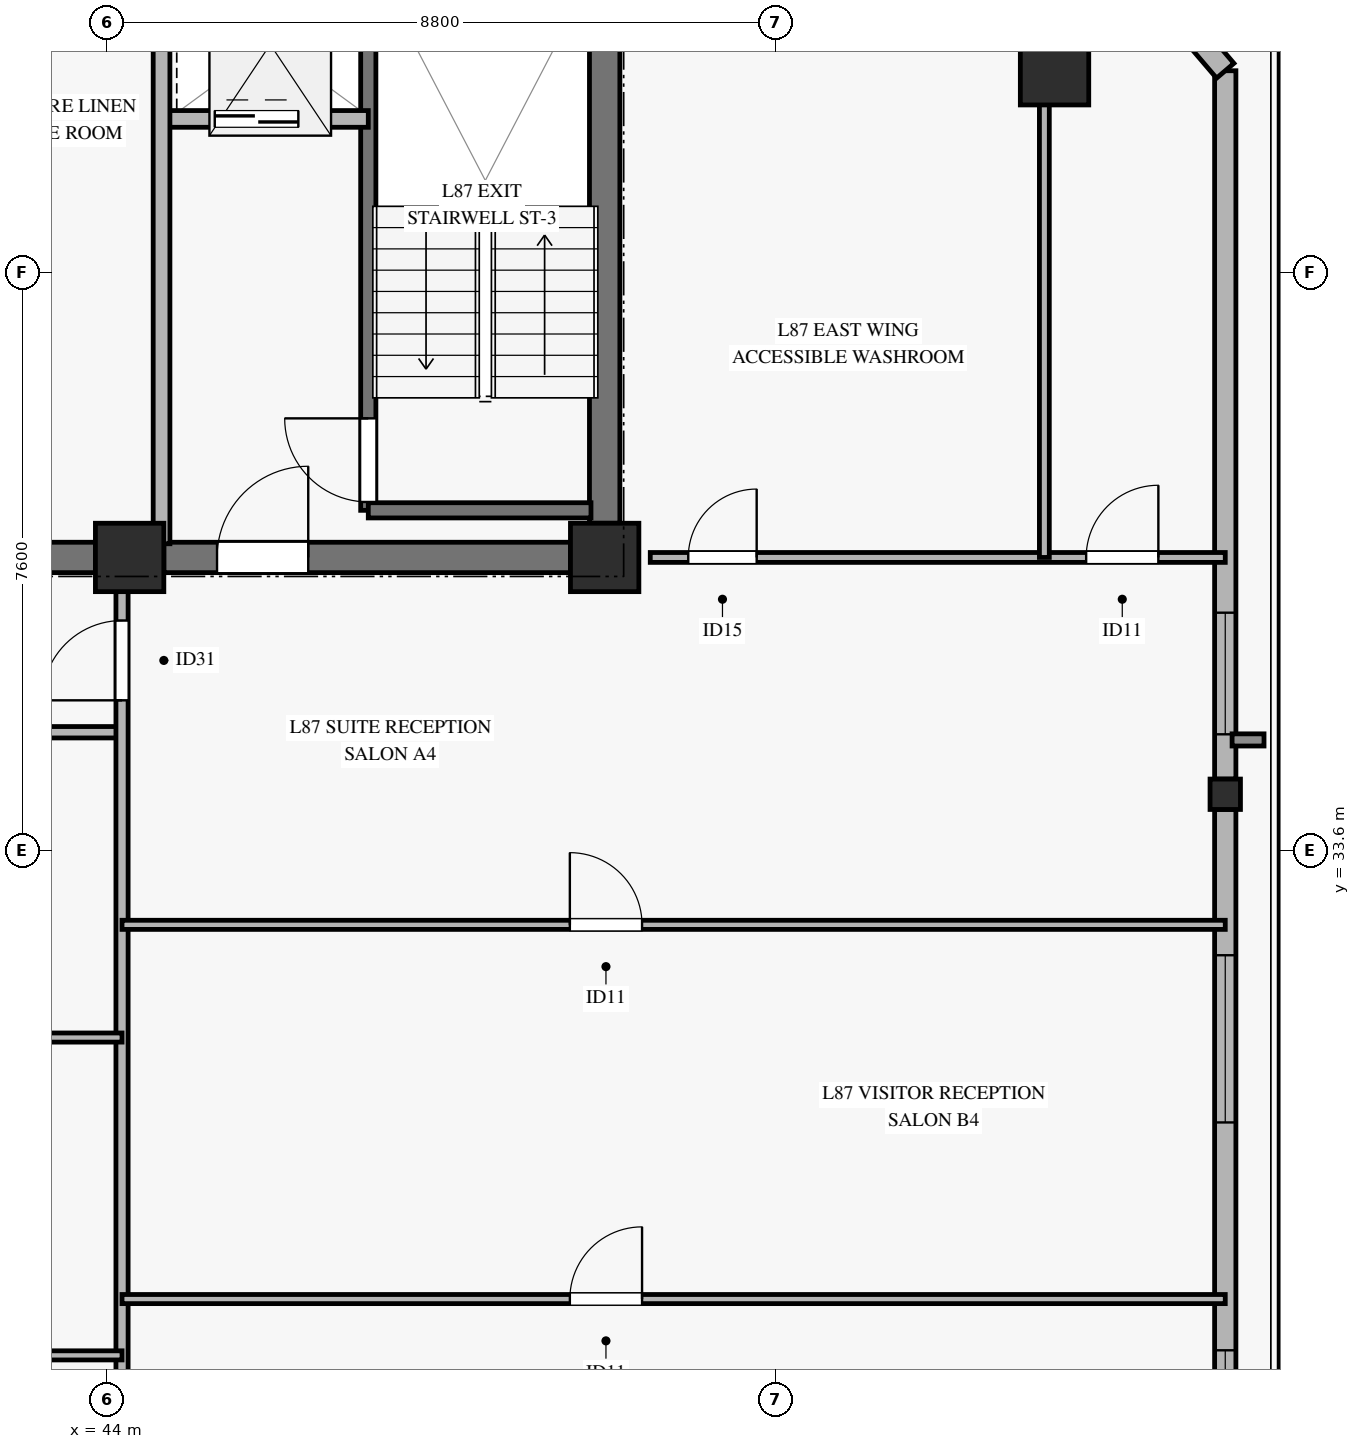
"""IFC4 building model, lengths in metres.
Left out: names, types, materials, properties, quantities, classifications, styles, units other than length and angle.
Written with IfcOpenShell. Run it as: python <this file> out.ifc"""

import sys

from ifc_helpers import new_model, si_unit, direction, frame, frame_2d, origin, origin_2d, place, context, subcontext, project, spatial, rectangle, hollow_rectangle, extrude, source, transform, mapped, element, fill, save


model = new_model("IFC4")
c1 = context("Model", 3, precision=1e-05, world=origin(), true_north=direction((0.0, 1.0)))
c2 = subcontext(c1, "Body", "Model", "MODEL_VIEW")
j1 = project(units=[si_unit("LENGTHUNIT", "METRE"), si_unit("PLANEANGLEUNIT", "RADIAN")], contexts=[c1])
p1 = place(None, origin())
s1 = spatial("IfcSite", under=j1, at=p1, CompositionType="ELEMENT")
p2 = place(p1, origin())
s2 = spatial("IfcBuilding", under=s1, at=p2, CompositionType="ELEMENT")
p3 = place(p2, frame((0.0, 0.0, 335.7)))
s3 = spatial("IfcBuildingStorey", under=s2, at=p3, CompositionType="ELEMENT", Elevation=335.7)
m1 = source(origin(), c2, "Body", "SweptSolid", [
    extrude(rectangle(XDim=0.9, YDim=0.9, at=origin_2d()), origin(), (0.0, 0.0, 1.0), 3.185),
])
for number, where, z_axis, x_axis in (
    (1, (44.3, 37.45, 0.0), (0.0, 0.0, 1.0), (1.0, 0.0, 0.0)),
    (2, (50.55, 37.45, 0.0), (0.0, 0.0, 1.0), (1.0, 0.0, 0.0)),
):
    element("IfcColumn", number, at=place(p3, frame(where, z_axis=z_axis, x_axis=x_axis)), inside=s3, PredefinedType="PILASTER", context=c2, shape_type="MappedRepresentation", body=[
        mapped(m1, transform((0.0, 0.0, 0.0), x_axis=(1.0, 0.0, 0.0), y_axis=(0.0, 1.0, 0.0), z_axis=(0.0, 0.0, 1.0), scale=1.0)),
    ])
p4 = place(p3, frame((36.05, 37.45, 0.0), z_axis=(0.0, 0.0, 1.0), x_axis=(1.0, 0.0, 0.0)))
e3 = element("IfcWall", 3, at=p4, inside=s3, PredefinedType="SHEAR", context=c2, shape_type="SweptSolid", body=[
    extrude(rectangle(XDim=7.8, YDim=0.4, at=frame_2d((3.9, 0.0))), origin(), (0.0, 0.0, 1.0), 3.185),
])
p5 = place(p3, frame((44.75, 37.45, 0.0), z_axis=(0.0, 0.0, 1.0), x_axis=(1.0, 0.0, 0.0)))
e4 = element("IfcWall", 4, at=p5, inside=s3, PredefinedType="SHEAR", context=c2, shape_type="SweptSolid", body=[
    extrude(rectangle(XDim=5.35, YDim=0.4, at=frame_2d((2.675, 0.0))), origin(), (0.0, 0.0, 1.0), 3.185),
])
p6 = place(p5, frame((0.7, 0.0, 0.0)))
e5 = element("IfcOpeningElement", 5, at=p6, cuts=e4, PredefinedType="OPENING", context=c2, shape_type="SweptSolid", body=[
    extrude(rectangle(XDim=1.2, YDim=2.15, at=frame_2d((0.6, 1.075))), frame((0.0, 0.21, 0.0), z_axis=(0.0, -1.0, 0.0), x_axis=(1.0, 0.0, 0.0)), (0.0, 0.0, 1.0), 0.42),
])
p7 = place(p3, frame((50.55, 37.9, 0.0), z_axis=(0.0, 0.0, 1.0), x_axis=(0.0, 1.0, 0.0)))
e6 = element("IfcWall", 6, at=p7, inside=s3, PredefinedType="SHEAR", context=c2, shape_type="SweptSolid", body=[
    extrude(rectangle(XDim=8.2, YDim=0.4, at=frame_2d((4.1, 0.0))), origin(), (0.0, 0.0, 1.0), 3.185),
])
m2 = source(origin(), c2, "Body", "SweptSolid", [
    extrude(hollow_rectangle(XDim=0.9, YDim=0.9, WallThickness=0.04, at=origin_2d()), origin(), (0.0, 0.0, 1.0), 3.185),
])
p8 = place(p3, frame((56.469, 43.854, 0.0), z_axis=(0.0, 0.0, 1.0), x_axis=(1.0, 0.0, 0.0)))
e7 = element("IfcColumn", 7, at=p8, inside=s3, PredefinedType="COLUMN", context=c2, shape_type="MappedRepresentation", body=[
    mapped(m2, transform((0.0, 0.0, 0.0), x_axis=(1.0, 0.0, 0.0), y_axis=(0.0, 1.0, 0.0), z_axis=(0.0, 0.0, 1.0), scale=1.0)),
])
m3 = source(origin(), c2, "Body", "SweptSolid", [
    extrude(hollow_rectangle(XDim=0.4, YDim=0.4, WallThickness=0.02, at=origin_2d()), origin(), (0.0, 0.0, 1.0), 3.185),
])
p9 = place(p3, frame((58.715, 34.334, 0.0), z_axis=(0.0, 0.0, 1.0), x_axis=(1.0, 0.0, 0.0)))
e8 = element("IfcColumn", 8, at=p9, inside=s3, PredefinedType="COLUMN", context=c2, shape_type="MappedRepresentation", body=[
    mapped(m3, transform((0.0, 0.0, 0.0), x_axis=(1.0, 0.0, 0.0), y_axis=(0.0, 1.0, 0.0), z_axis=(0.0, 0.0, 1.0), scale=1.0)),
])
p10 = place(p3, frame((58.715, 24.814, 0.0), z_axis=(0.0, 0.0, 1.0), x_axis=(0.0, 1.0, 0.0)))
e9 = element("IfcWall", 9, at=p10, inside=s3, PredefinedType="SOLIDWALL", context=c2, shape_type="SweptSolid", body=[
    extrude(rectangle(XDim=9.32, YDim=0.28, at=frame_2d((4.66, 0.0))), origin(), (0.0, 0.0, 1.0), 2.815),
])
p11 = place(p10, frame((0.604, 0.0, 0.45)))
e10 = element("IfcOpeningElement", 10, at=p11, cuts=e9, PredefinedType="OPENING", context=c2, shape_type="SweptSolid", body=[
    extrude(rectangle(XDim=1.6, YDim=2.0, at=frame_2d((0.8, 1.0))), frame((0.0, 0.15, 0.0), z_axis=(0.0, -1.0, 0.0), x_axis=(1.0, 0.0, 0.0)), (0.0, 0.0, 1.0), 0.3),
])
p12 = place(p10, frame((5.202, 0.0, 0.45)))
e11 = element("IfcOpeningElement", 11, at=p12, cuts=e9, PredefinedType="OPENING", context=c2, shape_type="SweptSolid", body=[
    extrude(rectangle(XDim=2.2, YDim=2.1, at=frame_2d((1.1, 1.05))), frame((0.0, 0.15, 0.0), z_axis=(0.0, -1.0, 0.0), x_axis=(1.0, 0.0, 0.0)), (0.0, 0.0, 1.0), 0.3),
])
p13 = place(p3, frame((58.715, 34.534, 0.0), z_axis=(0.0, 0.0, 1.0), x_axis=(0.0, 1.0, 0.0)))
e12 = element("IfcWall", 12, at=p13, inside=s3, PredefinedType="SOLIDWALL", context=c2, shape_type="SweptSolid", body=[
    extrude(rectangle(XDim=9.32, YDim=0.28, at=frame_2d((4.66, 0.0))), origin(), (0.0, 0.0, 1.0), 2.815),
])
p14 = place(p13, frame((0.589, 0.0, 0.45)))
e13 = element("IfcOpeningElement", 13, at=p14, cuts=e12, PredefinedType="OPENING", context=c2, shape_type="SweptSolid", body=[
    extrude(rectangle(XDim=1.6, YDim=2.0, at=frame_2d((0.8, 1.0))), frame((0.0, 0.15, 0.0), z_axis=(0.0, -1.0, 0.0), x_axis=(1.0, 0.0, 0.0)), (0.0, 0.0, 1.0), 0.3),
])
p15 = place(p3, frame((58.715, 43.854, 0.0), z_axis=(0.0, 0.0, 1.0), x_axis=(-0.64940558052, 0.760442234486, 0.0)))
e14 = element("IfcWall", 14, at=p15, inside=s3, PredefinedType="SOLIDWALL", context=c2, shape_type="SweptSolid", body=[
    extrude(rectangle(XDim=3.151, YDim=0.3, at=frame_2d((1.575, 0.0))), origin(), (0.0, 0.0, 1.0), 2.815),
])
p16 = place(p15, frame((0.775, 0.0, 0.45)))
e15 = element("IfcOpeningElement", 15, at=p16, cuts=e14, PredefinedType="OPENING", context=c2, shape_type="SweptSolid", body=[
    extrude(rectangle(XDim=1.6, YDim=2.0, at=frame_2d((0.8, 1.0))), frame((0.0, 0.16, 0.0), z_axis=(0.0, -1.0, 0.0), x_axis=(1.0, 0.0, 0.0)), (0.0, 0.0, 1.0), 0.32),
])
p17 = place(p3, frame((47.44, 38.07, 0.0), z_axis=(0.0, 0.0, 1.0), x_axis=(0.0, 1.0, 0.0)))
e16 = element("IfcWall", 16, at=p17, inside=s3, PredefinedType="SOLIDWALL", context=c2, shape_type="SweptSolid", body=[
    extrude(rectangle(XDim=7.25, YDim=0.2, at=frame_2d((3.625, 0.0))), origin(), (0.0, 0.0, 1.0), 3.4),
])
p18 = place(p17, frame((0.11, 0.0, 0.0)))
e17 = element("IfcOpeningElement", 17, at=p18, cuts=e16, PredefinedType="OPENING", context=c2, shape_type="SweptSolid", body=[
    extrude(rectangle(XDim=1.1, YDim=2.15, at=frame_2d((0.55, 1.075))), frame((0.0, 0.11, 0.0), z_axis=(0.0, -1.0, 0.0), x_axis=(1.0, 0.0, 0.0)), (0.0, 0.0, 1.0), 0.22),
])
p19 = place(p3, frame((47.44, 38.07, 0.0), z_axis=(0.0, 0.0, 1.0), x_axis=(1.0, 0.0, 0.0)))
e18 = element("IfcWall", 18, at=p19, inside=s3, PredefinedType="SOLIDWALL", context=c2, shape_type="SweptSolid", body=[
    extrude(rectangle(XDim=2.93, YDim=0.2, at=frame_2d((1.465, 0.0))), origin(), (0.0, 0.0, 1.0), 3.4),
])
p20 = place(p3, frame((44.72, 43.22, 0.0), z_axis=(0.0, 0.0, 1.0), x_axis=(1.0, 0.0, 0.0)))
e19 = element("IfcWall", 19, at=p20, inside=s3, PredefinedType="SOLIDWALL", context=c2, shape_type="SweptSolid", body=[
    extrude(rectangle(XDim=2.72, YDim=0.22, at=frame_2d((1.36, 0.0))), origin(), (0.0, 0.0, 1.0), 3.185),
])
p21 = place(p20, frame((0.7, 0.0, 0.0)))
e20 = element("IfcOpeningElement", 20, at=p21, cuts=e19, PredefinedType="OPENING", context=c2, shape_type="SweptSolid", body=[
    extrude(rectangle(XDim=1.1, YDim=2.2, at=frame_2d((0.55, 1.1))), frame((0.0, 0.12, 0.0), z_axis=(0.0, -1.0, 0.0), x_axis=(1.0, 0.0, 0.0)), (0.0, 0.0, 1.0), 0.24),
])
p22 = place(p3, frame((44.72, 37.63, 0.0), z_axis=(0.0, 0.0, 1.0), x_axis=(0.0, 1.0, 0.0)))
e21 = element("IfcWall", 21, at=p22, inside=s3, PredefinedType="SOLIDWALL", context=c2, shape_type="SweptSolid", body=[
    extrude(rectangle(XDim=7.59, YDim=0.22, at=frame_2d((3.795, 0.0))), origin(), (0.0, 0.0, 1.0), 3.185),
])
p23 = place(p3, frame((21.0, 35.15, 0.0), z_axis=(0.0, 0.0, 1.0), x_axis=(1.0, 0.0, 0.0)))
e22 = element("IfcWall", 22, at=p23, inside=s3, PredefinedType="PARTITIONING", context=c2, shape_type="SweptSolid", body=[
    extrude(rectangle(XDim=23.2, YDim=0.15, at=frame_2d((11.6, 0.0))), origin(), (0.0, 0.0, 1.0), 2.47),
])
p24 = place(p23, frame((4.577, 0.0, 0.0)))
e23 = element("IfcOpeningElement", 23, at=p24, cuts=e22, PredefinedType="OPENING", context=c2, shape_type="SweptSolid", body=[
    extrude(rectangle(XDim=1.05, YDim=2.15, at=frame_2d((0.525, 1.075))), frame((0.0, 0.085, 0.0), z_axis=(0.0, -1.0, 0.0), x_axis=(1.0, 0.0, 0.0)), (0.0, 0.0, 1.0), 0.17),
])
p25 = place(p23, frame((16.177, 0.0, 0.0)))
e24 = element("IfcOpeningElement", 24, at=p25, cuts=e22, PredefinedType="OPENING", context=c2, shape_type="SweptSolid", body=[
    extrude(rectangle(XDim=1.05, YDim=2.15, at=frame_2d((0.525, 1.075))), frame((0.0, 0.085, 0.0), z_axis=(0.0, -1.0, 0.0), x_axis=(1.0, 0.0, 0.0)), (0.0, 0.0, 1.0), 0.17),
])
p26 = place(p3, frame((44.2, 22.568, 0.0), z_axis=(0.0, 0.0, 1.0), x_axis=(0.0, 1.0, 0.0)))
e25 = element("IfcWall", 25, at=p26, inside=s3, PredefinedType="PARTITIONING", context=c2, shape_type="SweptSolid", body=[
    extrude(rectangle(XDim=14.882, YDim=0.16, at=frame_2d((7.441, 0.0))), origin(), (0.0, 0.0, 1.0), 2.47),
])
p27 = place(p26, frame((13.002, 0.0, 0.0)))
e26 = element("IfcOpeningElement", 26, at=p27, cuts=e25, PredefinedType="OPENING", context=c2, shape_type="SweptSolid", body=[
    extrude(rectangle(XDim=1.05, YDim=2.15, at=frame_2d((0.525, 1.075))), frame((0.0, 0.09, 0.0), z_axis=(0.0, -1.0, 0.0), x_axis=(1.0, 0.0, 0.0)), (0.0, 0.0, 1.0), 0.18),
])
p28 = place(p3, frame((32.6, 26.951, 0.0), z_axis=(0.0, 0.0, 1.0), x_axis=(1.0, 0.0, 0.0)))
e27 = element("IfcWall", 27, at=p28, inside=s3, PredefinedType="PARTITIONING", context=c2, shape_type="SweptSolid", body=[
    extrude(rectangle(XDim=11.6, YDim=0.12, at=frame_2d((5.8, 0.0))), origin(), (0.0, 0.0, 1.0), 2.47),
])
p29 = place(p28, frame((4.806, 0.0, 0.0)))
e28 = element("IfcOpeningElement", 28, at=p29, cuts=e27, PredefinedType="OPENING", context=c2, shape_type="SweptSolid", body=[
    extrude(rectangle(XDim=0.95, YDim=2.1, at=frame_2d((0.475, 1.05))), frame((0.0, 0.07, 0.0), z_axis=(0.0, -1.0, 0.0), x_axis=(1.0, 0.0, 0.0)), (0.0, 0.0, 1.0), 0.14),
])
p30 = place(p3, frame((32.6, 31.133, 0.0), z_axis=(0.0, 0.0, 1.0), x_axis=(1.0, 0.0, 0.0)))
e29 = element("IfcWall", 29, at=p30, inside=s3, PredefinedType="PARTITIONING", context=c2, shape_type="SweptSolid", body=[
    extrude(rectangle(XDim=11.6, YDim=0.12, at=frame_2d((5.8, 0.0))), origin(), (0.0, 0.0, 1.0), 2.47),
])
p31 = place(p30, frame((4.806, 0.0, 0.0)))
e30 = element("IfcOpeningElement", 30, at=p31, cuts=e29, PredefinedType="OPENING", context=c2, shape_type="SweptSolid", body=[
    extrude(rectangle(XDim=0.95, YDim=2.1, at=frame_2d((0.475, 1.05))), frame((0.0, 0.07, 0.0), z_axis=(0.0, -1.0, 0.0), x_axis=(1.0, 0.0, 0.0)), (0.0, 0.0, 1.0), 0.14),
])
p32 = place(p3, frame((44.2, 27.692, 0.0), z_axis=(0.0, 0.0, 1.0), x_axis=(1.0, 0.0, 0.0)))
e31 = element("IfcWall", 31, at=p32, inside=s3, PredefinedType="PARTITIONING", context=c2, shape_type="SweptSolid", body=[
    extrude(rectangle(XDim=14.515, YDim=0.12, at=frame_2d((7.258, 0.0))), origin(), (0.0, 0.0, 1.0), 2.47),
])
p33 = place(p32, frame((5.892, 0.0, 0.0)))
e32 = element("IfcOpeningElement", 32, at=p33, cuts=e31, PredefinedType="OPENING", context=c2, shape_type="SweptSolid", body=[
    extrude(rectangle(XDim=0.95, YDim=2.1, at=frame_2d((0.475, 1.05))), frame((0.0, 0.07, 0.0), z_axis=(0.0, -1.0, 0.0), x_axis=(1.0, 0.0, 0.0)), (0.0, 0.0, 1.0), 0.14),
])
p34 = place(p3, frame((44.2, 32.616, 0.0), z_axis=(0.0, 0.0, 1.0), x_axis=(1.0, 0.0, 0.0)))
e33 = element("IfcWall", 33, at=p34, inside=s3, PredefinedType="PARTITIONING", context=c2, shape_type="SweptSolid", body=[
    extrude(rectangle(XDim=14.515, YDim=0.12, at=frame_2d((7.258, 0.0))), origin(), (0.0, 0.0, 1.0), 2.47),
])
p35 = place(p34, frame((5.892, 0.0, 0.0)))
e34 = element("IfcOpeningElement", 34, at=p35, cuts=e33, PredefinedType="OPENING", context=c2, shape_type="SweptSolid", body=[
    extrude(rectangle(XDim=0.95, YDim=2.1, at=frame_2d((0.475, 1.05))), frame((0.0, 0.07, 0.0), z_axis=(0.0, -1.0, 0.0), x_axis=(1.0, 0.0, 0.0)), (0.0, 0.0, 1.0), 0.14),
])
p36 = place(p3, frame((51.15, 37.45, 0.0), z_axis=(0.0, 0.0, 1.0), x_axis=(1.0, 0.0, 0.0)))
e35 = element("IfcWall", 35, at=p36, inside=s3, PredefinedType="PARTITIONING", context=c2, shape_type="SweptSolid", body=[
    extrude(rectangle(XDim=7.565, YDim=0.13, at=frame_2d((3.783, 0.0))), origin(), (0.0, 0.0, 1.0), 2.82),
])
p37 = place(p36, frame((0.5, 0.0, 0.0)))
e36 = element("IfcOpeningElement", 36, at=p37, cuts=e35, PredefinedType="OPENING", context=c2, shape_type="SweptSolid", body=[
    extrude(rectangle(XDim=0.9, YDim=2.1, at=frame_2d((0.45, 1.05))), frame((0.0, 0.075, 0.0), z_axis=(0.0, -1.0, 0.0), x_axis=(1.0, 0.0, 0.0)), (0.0, 0.0, 1.0), 0.15),
])
p38 = place(p36, frame((5.735, 0.0, 0.0)))
e37 = element("IfcOpeningElement", 37, at=p38, cuts=e35, PredefinedType="OPENING", context=c2, shape_type="SweptSolid", body=[
    extrude(rectangle(XDim=0.95, YDim=2.1, at=frame_2d((0.475, 1.05))), frame((0.0, 0.075, 0.0), z_axis=(0.0, -1.0, 0.0), x_axis=(1.0, 0.0, 0.0)), (0.0, 0.0, 1.0), 0.15),
])
p39 = place(p3, frame((56.335, 37.45, 0.0), z_axis=(0.0, 0.0, 1.0), x_axis=(0.0, 1.0, 0.0)))
e38 = element("IfcWall", 38, at=p39, inside=s3, PredefinedType="PARTITIONING", context=c2, shape_type="SweptSolid", body=[
    extrude(rectangle(XDim=8.8, YDim=0.13, at=frame_2d((4.4, 0.0))), origin(), (0.0, 0.0, 1.0), 2.82),
])
m4 = source(origin(), c2, "Body", "SweptSolid", [
    extrude(rectangle(XDim=1.6, YDim=2.0, at=frame_2d((0.8, 1.0))), frame((0.0, 0.03, 0.0), z_axis=(0.0, -1.0, 0.0), x_axis=(1.0, 0.0, 0.0)), (0.0, 0.0, 1.0), 0.06),
])
p40 = place(p11, origin())
e39 = element("IfcWindow", 39, at=p40, inside=s3, PartitioningType="SINGLE_PANEL", PredefinedType="WINDOW", context=c2, shape_type="MappedRepresentation", body=[
    mapped(m4, transform((0.0, 0.0, 0.0), x_axis=(1.0, 0.0, 0.0), y_axis=(0.0, 1.0, 0.0), z_axis=(0.0, 0.0, 1.0), scale=1.0)),
])
fill(e10, e39)
m5 = source(origin(), c2, "Body", "SweptSolid", [
    extrude(rectangle(XDim=2.2, YDim=2.1, at=frame_2d((1.1, 1.05))), frame((0.0, 0.03, 0.0), z_axis=(0.0, -1.0, 0.0), x_axis=(1.0, 0.0, 0.0)), (0.0, 0.0, 1.0), 0.06),
])
p41 = place(p12, origin())
e40 = element("IfcWindow", 40, at=p41, inside=s3, PartitioningType="SINGLE_PANEL", PredefinedType="WINDOW", context=c2, shape_type="MappedRepresentation", body=[
    mapped(m5, transform((0.0, 0.0, 0.0), x_axis=(1.0, 0.0, 0.0), y_axis=(0.0, 1.0, 0.0), z_axis=(0.0, 0.0, 1.0), scale=1.0)),
])
fill(e11, e40)
p42 = place(p14, origin())
e41 = element("IfcWindow", 41, at=p42, inside=s3, PartitioningType="SINGLE_PANEL", PredefinedType="WINDOW", context=c2, shape_type="MappedRepresentation", body=[
    mapped(m4, transform((0.0, 0.0, 0.0), x_axis=(1.0, 0.0, 0.0), y_axis=(0.0, 1.0, 0.0), z_axis=(0.0, 0.0, 1.0), scale=1.0)),
])
fill(e13, e41)
m6 = source(origin(), c2, "Body", "SweptSolid", [
    extrude(rectangle(XDim=1.1, YDim=2.15, at=frame_2d((0.55, 1.075))), frame((0.0, 0.025, 0.0), z_axis=(0.0, -1.0, 0.0), x_axis=(1.0, 0.0, 0.0)), (0.0, 0.0, 1.0), 0.05),
])
p43 = place(p18, origin())
e42 = element("IfcDoor", 42, at=p43, inside=s3, OperationType="SINGLE_SWING_RIGHT", PredefinedType="DOOR", context=c2, shape_type="MappedRepresentation", body=[
    mapped(m6, transform((0.0, 0.0, 0.0), x_axis=(1.0, 0.0, 0.0), y_axis=(0.0, 1.0, 0.0), z_axis=(0.0, 0.0, 1.0), scale=1.0)),
])
fill(e17, e42)
m7 = source(origin(), c2, "Body", "SweptSolid", [
    extrude(rectangle(XDim=1.1, YDim=2.2, at=frame_2d((0.55, 1.1))), frame((0.0, 0.025, 0.0), z_axis=(0.0, -1.0, 0.0), x_axis=(1.0, 0.0, 0.0)), (0.0, 0.0, 1.0), 0.05),
])
p44 = place(p21, origin())
e43 = element("IfcDoor", 43, at=p44, inside=s3, OperationType="SLIDING_TO_LEFT", PredefinedType="DOOR", context=c2, shape_type="MappedRepresentation", body=[
    mapped(m7, transform((0.0, 0.0, 0.0), x_axis=(1.0, 0.0, 0.0), y_axis=(0.0, 1.0, 0.0), z_axis=(0.0, 0.0, 1.0), scale=1.0)),
])
fill(e20, e43)
m8 = source(origin(), c2, "Body", "SweptSolid", [
    extrude(rectangle(XDim=1.2, YDim=2.15, at=frame_2d((0.6, 1.075))), frame((0.0, 0.025, 0.0), z_axis=(0.0, -1.0, 0.0), x_axis=(1.0, 0.0, 0.0)), (0.0, 0.0, 1.0), 0.05),
])
p45 = place(p6, origin())
e44 = element("IfcDoor", 44, at=p45, inside=s3, OperationType="SINGLE_SWING_RIGHT", PredefinedType="DOOR", context=c2, shape_type="MappedRepresentation", body=[
    mapped(m8, transform((0.0, 0.0, 0.0), x_axis=(1.0, 0.0, 0.0), y_axis=(0.0, 1.0, 0.0), z_axis=(0.0, 0.0, 1.0), scale=1.0)),
])
fill(e5, e44)
m9 = source(origin(), c2, "Body", "SweptSolid", [
    extrude(rectangle(XDim=1.05, YDim=2.15, at=frame_2d((0.525, 1.075))), frame((0.0, 0.025, 0.0), z_axis=(0.0, -1.0, 0.0), x_axis=(1.0, 0.0, 0.0)), (0.0, 0.0, 1.0), 0.05),
])
p46 = place(p27, origin())
e45 = element("IfcDoor", 45, at=p46, inside=s3, OperationType="SINGLE_SWING_LEFT", PredefinedType="DOOR", context=c2, shape_type="MappedRepresentation", body=[
    mapped(m9, transform((0.0, 0.0, 0.0), x_axis=(1.0, 0.0, 0.0), y_axis=(0.0, 1.0, 0.0), z_axis=(0.0, 0.0, 1.0), scale=1.0)),
])
fill(e26, e45)
m10 = source(origin(), c2, "Body", "SweptSolid", [
    extrude(rectangle(XDim=0.95, YDim=2.1, at=frame_2d((0.475, 1.05))), frame((0.0, 0.025, 0.0), z_axis=(0.0, -1.0, 0.0), x_axis=(1.0, 0.0, 0.0)), (0.0, 0.0, 1.0), 0.05),
])
p47 = place(p35, origin())
e46 = element("IfcDoor", 46, at=p47, inside=s3, OperationType="SINGLE_SWING_LEFT", PredefinedType="DOOR", context=c2, shape_type="MappedRepresentation", body=[
    mapped(m10, transform((0.0, 0.0, 0.0), x_axis=(1.0, 0.0, 0.0), y_axis=(0.0, 1.0, 0.0), z_axis=(0.0, 0.0, 1.0), scale=1.0)),
])
fill(e34, e46)
p48 = place(p33, origin())
e47 = element("IfcDoor", 47, at=p48, inside=s3, OperationType="SINGLE_SWING_RIGHT", PredefinedType="DOOR", context=c2, shape_type="MappedRepresentation", body=[
    mapped(m10, transform((0.0, 0.0, 0.0), x_axis=(1.0, 0.0, 0.0), y_axis=(0.0, 1.0, 0.0), z_axis=(0.0, 0.0, 1.0), scale=1.0)),
])
fill(e32, e47)
m11 = source(origin(), c2, "Body", "SweptSolid", [
    extrude(rectangle(XDim=0.9, YDim=2.1, at=frame_2d((0.45, 1.05))), frame((0.0, 0.025, 0.0), z_axis=(0.0, -1.0, 0.0), x_axis=(1.0, 0.0, 0.0)), (0.0, 0.0, 1.0), 0.05),
])
p49 = place(p37, origin())
e48 = element("IfcDoor", 48, at=p49, inside=s3, OperationType="SINGLE_SWING_RIGHT", PredefinedType="DOOR", context=c2, shape_type="MappedRepresentation", body=[
    mapped(m11, transform((0.0, 0.0, 0.0), x_axis=(1.0, 0.0, 0.0), y_axis=(0.0, 1.0, 0.0), z_axis=(0.0, 0.0, 1.0), scale=1.0)),
])
fill(e36, e48)
p50 = place(p38, origin())
e49 = element("IfcDoor", 49, at=p50, inside=s3, OperationType="SINGLE_SWING_RIGHT", PredefinedType="DOOR", context=c2, shape_type="MappedRepresentation", body=[
    mapped(m10, transform((0.0, 0.0, 0.0), x_axis=(1.0, 0.0, 0.0), y_axis=(0.0, 1.0, 0.0), z_axis=(0.0, 0.0, 1.0), scale=1.0)),
])
fill(e37, e49)
save(model, sys.argv[1])
